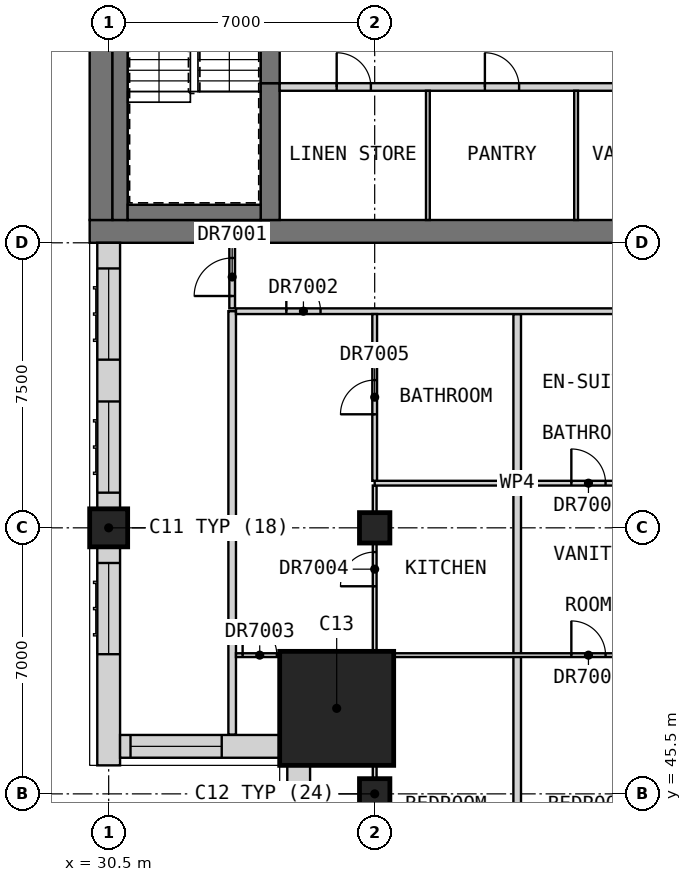
"""IFC4 building model, lengths in metres.
Left out: names, types, materials, properties, quantities, classifications, styles, units other than length and angle.
Written with IfcOpenShell. Run it as: python <this file> out.ifc"""

import sys

from ifc_helpers import new_model, si_unit, direction, frame, frame_2d, origin, origin_2d, place, context, subcontext, project, spatial, rectangle, extrude, element, fill, save


model = new_model("IFC4")
c1 = context("Model", 3, precision=1e-05, world=origin(), true_north=direction((0.0, 1.0)))
c2 = subcontext(c1, "Body", "Model", "MODEL_VIEW")
j1 = project(units=[si_unit("LENGTHUNIT", "METRE"), si_unit("PLANEANGLEUNIT", "RADIAN")], contexts=[c1])
p1 = place(None, origin())
s1 = spatial("IfcSite", under=j1, at=p1, CompositionType="ELEMENT")
p2 = place(p1, origin())
s2 = spatial("IfcBuilding", under=s1, at=p2, CompositionType="ELEMENT")
p3 = place(p2, frame((0.0, 0.0, 230.2)))
s3 = spatial("IfcBuildingStorey", under=s2, at=p3, CompositionType="ELEMENT", Elevation=230.2)
p4 = place(p3, frame((30.5, 52.5, 0.0), z_axis=(0.0, 0.0, 1.0), x_axis=(1.0, 0.0, 0.0)))
e1 = element("IfcColumn", 1, at=p4, inside=s3, PredefinedType="COLUMN", context=c2, shape_type="SweptSolid", body=[
    extrude(rectangle(XDim=1.0, YDim=1.0, at=origin_2d()), origin(), (0.0, 0.0, 1.0), 3.5),
])
for number, where, z_axis, x_axis in (
    (2, (37.5, 45.5, 0.0), (0.0, 0.0, 1.0), (1.0, 0.0, 0.0)),
    (3, (37.5, 52.5, 0.0), (0.0, 0.0, 1.0), (1.0, 0.0, 0.0)),
):
    element("IfcColumn", number, at=place(p3, frame(where, z_axis=z_axis, x_axis=x_axis)), inside=s3, PredefinedType="COLUMN", context=c2, shape_type="SweptSolid", body=[
        extrude(rectangle(XDim=0.8, YDim=0.8, at=origin_2d()), origin(), (0.0, 0.0, 1.0), 3.5),
    ])
p5 = place(p3, frame((36.5, 47.75, 0.0), z_axis=(0.0, 0.0, 1.0), x_axis=(1.0, 0.0, 0.0)))
e4 = element("IfcColumn", 4, at=p5, inside=s3, PredefinedType="COLUMN", context=c2, shape_type="SweptSolid", body=[
    extrude(rectangle(XDim=3.0, YDim=3.0, at=origin_2d()), origin(), (0.0, 0.0, 1.0), 3.5),
])
p6 = place(p3, frame((30.0, 60.3, 0.0), z_axis=(0.0, 0.0, 1.0), x_axis=(1.0, 0.0, 0.0)))
e5 = element("IfcWall", 5, at=p6, inside=s3, PredefinedType="SHEAR", context=c2, shape_type="SweptSolid", body=[
    extrude(rectangle(XDim=30.0, YDim=0.6, at=frame_2d((15.0, 0.0))), origin(), (0.0, 0.0, 1.0), 3.5),
])
p7 = place(p6, frame((21.9, 0.0, 0.0)))
e6 = element("IfcOpeningElement", 6, at=p7, cuts=e5, PredefinedType="OPENING", context=c2, shape_type="SweptSolid", body=[
    extrude(rectangle(XDim=1.8, YDim=2.1, at=frame_2d((0.9, 1.05))), frame((0.0, 0.31, 0.0), z_axis=(0.0, -1.0, 0.0), x_axis=(1.0, 0.0, 0.0)), (0.0, 0.0, 1.0), 0.62),
])
p8 = place(p6, frame((26.5, 0.0, 0.0)))
e7 = element("IfcOpeningElement", 7, at=p8, cuts=e5, PredefinedType="OPENING", context=c2, shape_type="SweptSolid", body=[
    extrude(rectangle(XDim=1.2, YDim=2.1, at=frame_2d((0.6, 1.05))), frame((0.0, 0.31, 0.0), z_axis=(0.0, -1.0, 0.0), x_axis=(1.0, 0.0, 0.0)), (0.0, 0.0, 1.0), 0.62),
])
p9 = place(p3, frame((30.3, 60.6, 0.0), z_axis=(0.0, 0.0, 1.0), x_axis=(0.0, 1.0, 0.0)))
e8 = element("IfcWall", 8, at=p9, inside=s3, PredefinedType="SHEAR", context=c2, shape_type="SweptSolid", body=[
    extrude(rectangle(XDim=21.3, YDim=0.6, at=frame_2d((10.65, 0.0))), origin(), (0.0, 0.0, 1.0), 3.5),
])
p10 = place(p3, frame((34.75, 60.6, 0.0), z_axis=(0.0, 0.0, 1.0), x_axis=(0.0, 1.0, 0.0)))
e9 = element("IfcWall", 9, at=p10, inside=s3, PredefinedType="SHEAR", context=c2, shape_type="SweptSolid", body=[
    extrude(rectangle(XDim=3.6, YDim=0.5, at=frame_2d((1.8, 0.0))), origin(), (0.0, 0.0, 1.0), 3.5),
])
p11 = place(p2, frame((0.0, 0.0, 34.0)))
s4 = spatial("IfcBuildingStorey", under=s2, at=p11, CompositionType="ELEMENT", Elevation=34.0)
p12 = place(p11, frame((29.7, 61.05, 0.0), z_axis=(0.0, 0.0, 1.0), x_axis=(0.0, 1.0, 0.0)))
e10 = element("IfcWall", 10, at=p12, inside=s4, PredefinedType="SOLIDWALL", context=c2, shape_type="SweptSolid", body=[
    extrude(rectangle(XDim=0.9, YDim=0.6, at=frame_2d((0.45, 0.0))), origin(), (0.0, 0.0, 1.0), 286.2),
])
p13 = place(p3, frame((30.5, 60.0, 0.0), z_axis=(0.0, 0.0, 1.0), x_axis=(0.0, -1.0, 0.0)))
e11 = element("IfcWall", 11, at=p13, inside=s3, PredefinedType="SOLIDWALL", context=c2, shape_type="SweptSolid", body=[
    extrude(rectangle(XDim=7.0, YDim=0.6, at=frame_2d((3.5, 0.0))), origin(), (0.0, 0.0, 1.0), 3.25),
])
p14 = place(p13, frame((4.175, 0.0, 0.8)))
e12 = element("IfcOpeningElement", 12, at=p14, cuts=e11, PredefinedType="OPENING", context=c2, shape_type="SweptSolid", body=[
    extrude(rectangle(XDim=2.4, YDim=1.8, at=frame_2d((1.2, 0.9))), frame((0.0, 0.31, 0.0), z_axis=(0.0, -1.0, 0.0), x_axis=(1.0, 0.0, 0.0)), (0.0, 0.0, 1.0), 0.62),
])
p15 = place(p13, frame((0.675, 0.0, 0.8)))
e13 = element("IfcOpeningElement", 13, at=p15, cuts=e11, PredefinedType="OPENING", context=c2, shape_type="SweptSolid", body=[
    extrude(rectangle(XDim=2.4, YDim=1.8, at=frame_2d((1.2, 0.9))), frame((0.0, 0.31, 0.0), z_axis=(0.0, -1.0, 0.0), x_axis=(1.0, 0.0, 0.0)), (0.0, 0.0, 1.0), 0.62),
])
p16 = place(p3, frame((30.5, 52.0, 0.0), z_axis=(0.0, 0.0, 1.0), x_axis=(0.0, -1.0, 0.0)))
e14 = element("IfcWall", 14, at=p16, inside=s3, PredefinedType="SOLIDWALL", context=c2, shape_type="SweptSolid", body=[
    extrude(rectangle(XDim=5.75, YDim=0.6, at=frame_2d((2.875, 0.0))), origin(), (0.0, 0.0, 1.0), 2.75),
])
p17 = place(p16, frame((0.425, 0.0, 0.8)))
e15 = element("IfcOpeningElement", 15, at=p17, cuts=e14, PredefinedType="OPENING", context=c2, shape_type="SweptSolid", body=[
    extrude(rectangle(XDim=2.4, YDim=1.8, at=frame_2d((1.2, 0.9))), frame((0.0, 0.31, 0.0), z_axis=(0.0, -1.0, 0.0), x_axis=(1.0, 0.0, 0.0)), (0.0, 0.0, 1.0), 0.62),
])
p18 = place(p3, frame((30.8, 46.75, 0.0), z_axis=(0.0, 0.0, 1.0), x_axis=(1.0, 0.0, 0.0)))
e16 = element("IfcWall", 16, at=p18, inside=s3, PredefinedType="SOLIDWALL", context=c2, shape_type="SweptSolid", body=[
    extrude(rectangle(XDim=4.2, YDim=0.6, at=frame_2d((2.1, 0.0))), origin(), (0.0, 0.0, 1.0), 3.25),
])
p19 = place(p18, frame((0.275, 0.0, 0.8)))
e17 = element("IfcOpeningElement", 17, at=p19, cuts=e16, PredefinedType="OPENING", context=c2, shape_type="SweptSolid", body=[
    extrude(rectangle(XDim=2.4, YDim=1.8, at=frame_2d((1.2, 0.9))), frame((0.0, 0.31, 0.0), z_axis=(0.0, -1.0, 0.0), x_axis=(1.0, 0.0, 0.0)), (0.0, 0.0, 1.0), 0.62),
])
p20 = place(p3, frame((35.5, 46.25, 0.0), z_axis=(0.0, 0.0, 1.0), x_axis=(0.0, -1.0, 0.0)))
e18 = element("IfcWall", 18, at=p20, inside=s3, PredefinedType="SOLIDWALL", context=c2, shape_type="SweptSolid", body=[
    extrude(rectangle(XDim=4.2, YDim=0.6, at=frame_2d((2.1, 0.0))), origin(), (0.0, 0.0, 1.0), 3.25),
])
p21 = place(p20, frame((1.525, 0.0, 0.8)))
e19 = element("IfcOpeningElement", 19, at=p21, cuts=e18, PredefinedType="OPENING", context=c2, shape_type="SweptSolid", body=[
    extrude(rectangle(XDim=2.4, YDim=1.8, at=frame_2d((1.2, 0.9))), frame((0.0, 0.31, 0.0), z_axis=(0.0, -1.0, 0.0), x_axis=(1.0, 0.0, 0.0)), (0.0, 0.0, 1.0), 0.62),
])
p22 = place(p3, frame((35.0, 64.1, 0.0), z_axis=(0.0, 0.0, 1.0), x_axis=(1.0, 0.0, 0.0)))
e20 = element("IfcWall", 20, at=p22, inside=s3, PredefinedType="PARTITIONING", context=c2, shape_type="SweptSolid", body=[
    extrude(rectangle(XDim=15.6, YDim=0.2, at=frame_2d((7.8, 0.0))), origin(), (0.0, 0.0, 1.0), 3.25),
])
p23 = place(p22, frame((1.5, 0.0, 0.0)))
e21 = element("IfcOpeningElement", 21, at=p23, cuts=e20, PredefinedType="OPENING", context=c2, shape_type="SweptSolid", body=[
    extrude(rectangle(XDim=0.9, YDim=2.1, at=frame_2d((0.45, 1.05))), frame((0.0, 0.11, 0.0), z_axis=(0.0, -1.0, 0.0), x_axis=(1.0, 0.0, 0.0)), (0.0, 0.0, 1.0), 0.22),
])
p24 = place(p22, frame((5.4, 0.0, 0.0)))
e22 = element("IfcOpeningElement", 22, at=p24, cuts=e20, PredefinedType="OPENING", context=c2, shape_type="SweptSolid", body=[
    extrude(rectangle(XDim=0.9, YDim=2.1, at=frame_2d((0.45, 1.05))), frame((0.0, 0.11, 0.0), z_axis=(0.0, -1.0, 0.0), x_axis=(1.0, 0.0, 0.0)), (0.0, 0.0, 1.0), 0.22),
])
p25 = place(p22, frame((9.3, 0.0, 0.0)))
e23 = element("IfcOpeningElement", 23, at=p25, cuts=e20, PredefinedType="OPENING", context=c2, shape_type="SweptSolid", body=[
    extrude(rectangle(XDim=0.9, YDim=2.1, at=frame_2d((0.45, 1.05))), frame((0.0, 0.11, 0.0), z_axis=(0.0, -1.0, 0.0), x_axis=(1.0, 0.0, 0.0)), (0.0, 0.0, 1.0), 0.22),
])
p26 = place(p22, frame((13.2, 0.0, 0.0)))
e24 = element("IfcOpeningElement", 24, at=p26, cuts=e20, PredefinedType="OPENING", context=c2, shape_type="SweptSolid", body=[
    extrude(rectangle(XDim=0.9, YDim=2.1, at=frame_2d((0.45, 1.05))), frame((0.0, 0.11, 0.0), z_axis=(0.0, -1.0, 0.0), x_axis=(1.0, 0.0, 0.0)), (0.0, 0.0, 1.0), 0.22),
])
for number, where, z_axis, x_axis in (
    (25, (38.9, 60.6, 0.0), (0.0, 0.0, 1.0), (0.0, 1.0, 0.0)),
    (26, (42.8, 60.6, 0.0), (0.0, 0.0, 1.0), (0.0, 1.0, 0.0)),
):
    element("IfcWall", number, at=place(p3, frame(where, z_axis=z_axis, x_axis=x_axis)), inside=s3, PredefinedType="PARTITIONING", context=c2, shape_type="SweptSolid", body=[
        extrude(rectangle(XDim=3.4, YDim=0.1, at=frame_2d((1.7, 0.0))), origin(), (0.0, 0.0, 1.0), 3.25),
    ])
p27 = place(p3, frame((34.75, 64.2, 0.0), z_axis=(0.0, 0.0, 1.0), x_axis=(0.0, 1.0, 0.0)))
e27 = element("IfcWall", 27, at=p27, inside=s3, PredefinedType="SOLIDWALL", context=c2, shape_type="SweptSolid", body=[
    extrude(rectangle(XDim=3.85, YDim=0.5, at=frame_2d((1.925, 0.0))), origin(), (0.0, 0.0, 1.0), 2.3),
])
p28 = place(p27, frame((2.3, 0.0, 0.0)))
e28 = element("IfcOpeningElement", 28, at=p28, cuts=e27, PredefinedType="OPENING", context=c2, shape_type="SweptSolid", body=[
    extrude(rectangle(XDim=1.2, YDim=2.1, at=frame_2d((0.6, 1.05))), frame((0.0, 0.26, 0.0), z_axis=(0.0, -1.0, 0.0), x_axis=(1.0, 0.0, 0.0)), (0.0, 0.0, 1.0), 0.52),
])
p29 = place(p3, frame((30.8, 60.6, 0.0), z_axis=(0.0, 0.0, 1.0), x_axis=(0.0, 1.0, 0.0)))
e29 = element("IfcWall", 29, at=p29, inside=s3, PredefinedType="SOLIDWALL", context=c2, shape_type="SweptSolid", body=[
    extrude(rectangle(XDim=21.3, YDim=0.4, at=frame_2d((10.65, 0.0))), origin(), (0.0, 0.0, 1.0), 3.25),
])
p30 = place(p3, frame((31.0, 60.8, 0.0), z_axis=(0.0, 0.0, 1.0), x_axis=(1.0, 0.0, 0.0)))
e30 = element("IfcWall", 30, at=p30, inside=s3, PredefinedType="SOLIDWALL", context=c2, shape_type="SweptSolid", body=[
    extrude(rectangle(XDim=3.5, YDim=0.4, at=frame_2d((1.75, 0.0))), origin(), (0.0, 0.0, 1.0), 3.25),
])
p31 = place(p3, frame((33.75, 47.06, 0.0), z_axis=(0.0, 0.0, 1.0), x_axis=(0.0, 1.0, 0.0)))
e31 = element("IfcWall", 31, at=p31, inside=s3, PredefinedType="PARTITIONING", context=c2, shape_type="SweptSolid", body=[
    extrude(rectangle(XDim=11.14, YDim=0.2, at=frame_2d((5.57, 0.0))), origin(), (0.0, 0.0, 1.0), 3.25),
])
p32 = place(p3, frame((41.25, 42.06, 0.0), z_axis=(0.0, 0.0, 1.0), x_axis=(0.0, 1.0, 0.0)))
e32 = element("IfcWall", 32, at=p32, inside=s3, PredefinedType="PARTITIONING", context=c2, shape_type="SweptSolid", body=[
    extrude(rectangle(XDim=16.065, YDim=0.2, at=frame_2d((8.032, 0.0))), origin(), (0.0, 0.0, 1.0), 3.25),
])
p33 = place(p3, frame((33.85, 58.2, 0.0), z_axis=(0.0, 0.0, 1.0), x_axis=(1.0, 0.0, 0.0)))
e33 = element("IfcWall", 33, at=p33, inside=s3, PredefinedType="PARTITIONING", context=c2, shape_type="SweptSolid", body=[
    extrude(rectangle(XDim=27.95, YDim=0.15, at=frame_2d((13.975, 0.0))), origin(), (0.0, 0.0, 1.0), 3.25),
])
p34 = place(p33, frame((1.325, 0.0, 0.0)))
e34 = element("IfcOpeningElement", 34, at=p34, cuts=e33, PredefinedType="OPENING", context=c2, shape_type="SweptSolid", body=[
    extrude(rectangle(XDim=0.9, YDim=2.1, at=frame_2d((0.45, 1.05))), frame((0.0, 0.085, 0.0), z_axis=(0.0, -1.0, 0.0), x_axis=(1.0, 0.0, 0.0)), (0.0, 0.0, 1.0), 0.17),
])
p35 = place(p33, frame((12.575, 0.0, 0.0)))
e35 = element("IfcOpeningElement", 35, at=p35, cuts=e33, PredefinedType="OPENING", context=c2, shape_type="SweptSolid", body=[
    extrude(rectangle(XDim=0.9, YDim=2.1, at=frame_2d((0.45, 1.05))), frame((0.0, 0.085, 0.0), z_axis=(0.0, -1.0, 0.0), x_axis=(1.0, 0.0, 0.0)), (0.0, 0.0, 1.0), 0.17),
])
p36 = place(p33, frame((20.075, 0.0, 0.0)))
e36 = element("IfcOpeningElement", 36, at=p36, cuts=e33, PredefinedType="OPENING", context=c2, shape_type="SweptSolid", body=[
    extrude(rectangle(XDim=0.9, YDim=2.1, at=frame_2d((0.45, 1.05))), frame((0.0, 0.085, 0.0), z_axis=(0.0, -1.0, 0.0), x_axis=(1.0, 0.0, 0.0)), (0.0, 0.0, 1.0), 0.17),
])
p37 = place(p33, frame((26.55, 0.0, 0.0)))
e37 = element("IfcOpeningElement", 37, at=p37, cuts=e33, PredefinedType="OPENING", context=c2, shape_type="SweptSolid", body=[
    extrude(rectangle(XDim=1.0, YDim=2.1, at=frame_2d((0.5, 1.05))), frame((0.0, 0.085, 0.0), z_axis=(0.0, -1.0, 0.0), x_axis=(1.0, 0.0, 0.0)), (0.0, 0.0, 1.0), 0.17),
])
p38 = place(p3, frame((33.75, 58.275, 0.0), z_axis=(0.0, 0.0, 1.0), x_axis=(0.0, 1.0, 0.0)))
e38 = element("IfcWall", 38, at=p38, inside=s3, PredefinedType="PARTITIONING", context=c2, shape_type="SweptSolid", body=[
    extrude(rectangle(XDim=1.725, YDim=0.15, at=frame_2d((0.863, 0.0))), origin(), (0.0, 0.0, 1.0), 3.25),
])
p39 = place(p38, frame((0.325, 0.0, 0.0)))
e39 = element("IfcOpeningElement", 39, at=p39, cuts=e38, PredefinedType="OPENING", context=c2, shape_type="SweptSolid", body=[
    extrude(rectangle(XDim=1.0, YDim=2.1, at=frame_2d((0.5, 1.05))), frame((0.0, 0.085, 0.0), z_axis=(0.0, -1.0, 0.0), x_axis=(1.0, 0.0, 0.0)), (0.0, 0.0, 1.0), 0.17),
])
p40 = place(p3, frame((33.85, 49.15, 0.0), z_axis=(0.0, 0.0, 1.0), x_axis=(1.0, 0.0, 0.0)))
e40 = element("IfcWall", 40, at=p40, inside=s3, PredefinedType="PARTITIONING", context=c2, shape_type="SweptSolid", body=[
    extrude(rectangle(XDim=26.05, YDim=0.1, at=frame_2d((13.025, 0.0))), origin(), (0.0, 0.0, 1.0), 3.25),
])
p41 = place(p40, frame((0.175, 0.0, 0.0)))
e41 = element("IfcOpeningElement", 41, at=p41, cuts=e40, PredefinedType="OPENING", context=c2, shape_type="SweptSolid", body=[
    extrude(rectangle(XDim=0.9, YDim=2.1, at=frame_2d((0.45, 1.05))), frame((0.0, 0.06, 0.0), z_axis=(0.0, -1.0, 0.0), x_axis=(1.0, 0.0, 0.0)), (0.0, 0.0, 1.0), 0.12),
])
p42 = place(p40, frame((8.825, 0.0, 0.0)))
e42 = element("IfcOpeningElement", 42, at=p42, cuts=e40, PredefinedType="OPENING", context=c2, shape_type="SweptSolid", body=[
    extrude(rectangle(XDim=0.9, YDim=2.1, at=frame_2d((0.45, 1.05))), frame((0.0, 0.06, 0.0), z_axis=(0.0, -1.0, 0.0), x_axis=(1.0, 0.0, 0.0)), (0.0, 0.0, 1.0), 0.12),
])
p43 = place(p40, frame((12.575, 0.0, 0.0)))
e43 = element("IfcOpeningElement", 43, at=p43, cuts=e40, PredefinedType="OPENING", context=c2, shape_type="SweptSolid", body=[
    extrude(rectangle(XDim=0.9, YDim=2.1, at=frame_2d((0.45, 1.05))), frame((0.0, 0.06, 0.0), z_axis=(0.0, -1.0, 0.0), x_axis=(1.0, 0.0, 0.0)), (0.0, 0.0, 1.0), 0.12),
])
p44 = place(p40, frame((20.075, 0.0, 0.0)))
e44 = element("IfcOpeningElement", 44, at=p44, cuts=e40, PredefinedType="OPENING", context=c2, shape_type="SweptSolid", body=[
    extrude(rectangle(XDim=0.9, YDim=2.1, at=frame_2d((0.45, 1.05))), frame((0.0, 0.06, 0.0), z_axis=(0.0, -1.0, 0.0), x_axis=(1.0, 0.0, 0.0)), (0.0, 0.0, 1.0), 0.12),
])
p45 = place(p3, frame((37.5, 41.25, 0.0), z_axis=(0.0, 0.0, 1.0), x_axis=(0.0, 1.0, 0.0)))
e45 = element("IfcWall", 45, at=p45, inside=s3, PredefinedType="PARTITIONING", context=c2, shape_type="SweptSolid", body=[
    extrude(rectangle(XDim=12.363, YDim=0.1, at=frame_2d((6.181, 0.0))), origin(), (0.0, 0.0, 1.0), 2.75),
])
p46 = place(p45, frame((9.712, 0.0, 0.0)))
e46 = element("IfcOpeningElement", 46, at=p46, cuts=e45, PredefinedType="OPENING", context=c2, shape_type="SweptSolid", body=[
    extrude(rectangle(XDim=0.9, YDim=2.1, at=frame_2d((0.45, 1.05))), frame((0.0, 0.06, 0.0), z_axis=(0.0, -1.0, 0.0), x_axis=(1.0, 0.0, 0.0)), (0.0, 0.0, 1.0), 0.12),
])
p47 = place(p45, frame((2.9, 0.0, 0.0)))
e47 = element("IfcOpeningElement", 47, at=p47, cuts=e45, PredefinedType="OPENING", context=c2, shape_type="SweptSolid", body=[
    extrude(rectangle(XDim=0.9, YDim=2.1, at=frame_2d((0.45, 1.05))), frame((0.0, 0.06, 0.0), z_axis=(0.0, -1.0, 0.0), x_axis=(1.0, 0.0, 0.0)), (0.0, 0.0, 1.0), 0.12),
])
p48 = place(p3, frame((37.5, 53.675, 0.0), z_axis=(0.0, 0.0, 1.0), x_axis=(1.0, 0.0, 0.0)))
e48 = element("IfcWall", 48, at=p48, inside=s3, PredefinedType="PARTITIONING", context=c2, shape_type="SweptSolid", body=[
    extrude(rectangle(XDim=7.5, YDim=0.125, at=frame_2d((3.75, 0.0))), origin(), (0.0, 0.0, 1.0), 3.25),
])
p49 = place(p48, frame((5.175, 0.0, 0.0)))
e49 = element("IfcOpeningElement", 49, at=p49, cuts=e48, PredefinedType="OPENING", context=c2, shape_type="SweptSolid", body=[
    extrude(rectangle(XDim=0.9, YDim=2.1, at=frame_2d((0.45, 1.05))), frame((0.0, 0.073, 0.0), z_axis=(0.0, -1.0, 0.0), x_axis=(1.0, 0.0, 0.0)), (0.0, 0.0, 1.0), 0.145),
])
p50 = place(p3, frame((37.5, 53.738, 0.0), z_axis=(0.0, 0.0, 1.0), x_axis=(0.0, 1.0, 0.0)))
e50 = element("IfcWall", 50, at=p50, inside=s3, PredefinedType="PARTITIONING", context=c2, shape_type="SweptSolid", body=[
    extrude(rectangle(XDim=4.387, YDim=0.125, at=frame_2d((2.194, 0.0))), origin(), (0.0, 0.0, 1.0), 3.25),
])
p51 = place(p50, frame((1.75, 0.0, 0.0)))
e51 = element("IfcOpeningElement", 51, at=p51, cuts=e50, PredefinedType="OPENING", context=c2, shape_type="SweptSolid", body=[
    extrude(rectangle(XDim=0.9, YDim=2.1, at=frame_2d((0.45, 1.05))), frame((0.0, 0.073, 0.0), z_axis=(0.0, -1.0, 0.0), x_axis=(1.0, 0.0, 0.0)), (0.0, 0.0, 1.0), 0.145),
])
p52 = place(p14, origin())
e52 = element("IfcWindow", 52, at=p52, inside=s3, PartitioningType="SINGLE_PANEL", PredefinedType="WINDOW", context=c2, shape_type="SweptSolid", body=[
    extrude(rectangle(XDim=2.4, YDim=1.8, at=frame_2d((1.2, 0.9))), frame((0.0, -0.07, 0.0), z_axis=(0.0, -1.0, 0.0), x_axis=(1.0, 0.0, 0.0)), (0.0, 0.0, 1.0), 0.06),
])
fill(e12, e52)
p53 = place(p15, origin())
e53 = element("IfcWindow", 53, at=p53, inside=s3, PartitioningType="SINGLE_PANEL", PredefinedType="WINDOW", context=c2, shape_type="SweptSolid", body=[
    extrude(rectangle(XDim=2.4, YDim=1.8, at=frame_2d((1.2, 0.9))), frame((0.0, -0.07, 0.0), z_axis=(0.0, -1.0, 0.0), x_axis=(1.0, 0.0, 0.0)), (0.0, 0.0, 1.0), 0.06),
])
fill(e13, e53)
p54 = place(p17, origin())
e54 = element("IfcWindow", 54, at=p54, inside=s3, PartitioningType="SINGLE_PANEL", PredefinedType="WINDOW", context=c2, shape_type="SweptSolid", body=[
    extrude(rectangle(XDim=2.4, YDim=1.8, at=frame_2d((1.2, 0.9))), frame((0.0, -0.07, 0.0), z_axis=(0.0, -1.0, 0.0), x_axis=(1.0, 0.0, 0.0)), (0.0, 0.0, 1.0), 0.06),
])
fill(e15, e54)
p55 = place(p19, origin())
e55 = element("IfcWindow", 55, at=p55, inside=s3, PartitioningType="SINGLE_PANEL", PredefinedType="WINDOW", context=c2, shape_type="SweptSolid", body=[
    extrude(rectangle(XDim=2.4, YDim=1.8, at=frame_2d((1.2, 0.9))), frame((0.0, -0.07, 0.0), z_axis=(0.0, -1.0, 0.0), x_axis=(1.0, 0.0, 0.0)), (0.0, 0.0, 1.0), 0.06),
])
fill(e17, e55)
p56 = place(p23, origin())
e56 = element("IfcDoor", 56, at=p56, inside=s3, OperationType="SINGLE_SWING_LEFT", PredefinedType="DOOR", context=c2, shape_type="SweptSolid", body=[
    extrude(rectangle(XDim=0.9, YDim=2.1, at=frame_2d((0.45, 1.05))), frame((0.0, 0.025, 0.0), z_axis=(0.0, -1.0, 0.0), x_axis=(1.0, 0.0, 0.0)), (0.0, 0.0, 1.0), 0.05),
])
fill(e21, e56)
p57 = place(p24, origin())
e57 = element("IfcDoor", 57, at=p57, inside=s3, OperationType="SINGLE_SWING_RIGHT", PredefinedType="DOOR", context=c2, shape_type="SweptSolid", body=[
    extrude(rectangle(XDim=0.9, YDim=2.1, at=frame_2d((0.45, 1.05))), frame((0.0, 0.025, 0.0), z_axis=(0.0, -1.0, 0.0), x_axis=(1.0, 0.0, 0.0)), (0.0, 0.0, 1.0), 0.05),
])
fill(e22, e57)
p58 = place(p39, origin())
e58 = element("IfcDoor", 58, at=p58, inside=s3, OperationType="SINGLE_SWING_RIGHT", PredefinedType="DOOR", context=c2, shape_type="SweptSolid", body=[
    extrude(rectangle(XDim=1.0, YDim=2.1, at=frame_2d((0.5, 1.05))), frame((0.0, 0.025, 0.0), z_axis=(0.0, -1.0, 0.0), x_axis=(1.0, 0.0, 0.0)), (0.0, 0.0, 1.0), 0.05),
])
fill(e39, e58)
p59 = place(p34, origin())
e59 = element("IfcDoor", 59, at=p59, inside=s3, OperationType="SINGLE_SWING_RIGHT", PredefinedType="DOOR", context=c2, shape_type="SweptSolid", body=[
    extrude(rectangle(XDim=0.9, YDim=2.1, at=frame_2d((0.45, 1.05))), frame((0.0, 0.025, 0.0), z_axis=(0.0, -1.0, 0.0), x_axis=(1.0, 0.0, 0.0)), (0.0, 0.0, 1.0), 0.05),
])
fill(e34, e59)
p60 = place(p41, origin())
e60 = element("IfcDoor", 60, at=p60, inside=s3, OperationType="SINGLE_SWING_LEFT", PredefinedType="DOOR", context=c2, shape_type="SweptSolid", body=[
    extrude(rectangle(XDim=0.9, YDim=2.1, at=frame_2d((0.45, 1.05))), frame((0.0, 0.025, 0.0), z_axis=(0.0, -1.0, 0.0), x_axis=(1.0, 0.0, 0.0)), (0.0, 0.0, 1.0), 0.05),
])
fill(e41, e60)
p61 = place(p46, origin())
e61 = element("IfcDoor", 61, at=p61, inside=s3, OperationType="SINGLE_SWING_LEFT", PredefinedType="DOOR", context=c2, shape_type="SweptSolid", body=[
    extrude(rectangle(XDim=0.9, YDim=2.1, at=frame_2d((0.45, 1.05))), frame((0.0, 0.025, 0.0), z_axis=(0.0, -1.0, 0.0), x_axis=(1.0, 0.0, 0.0)), (0.0, 0.0, 1.0), 0.05),
])
fill(e46, e61)
p62 = place(p51, origin())
e62 = element("IfcDoor", 62, at=p62, inside=s3, OperationType="SINGLE_SWING_RIGHT", PredefinedType="DOOR", context=c2, shape_type="SweptSolid", body=[
    extrude(rectangle(XDim=0.9, YDim=2.1, at=frame_2d((0.45, 1.05))), frame((0.0, 0.025, 0.0), z_axis=(0.0, -1.0, 0.0), x_axis=(1.0, 0.0, 0.0)), (0.0, 0.0, 1.0), 0.05),
])
fill(e51, e62)
p63 = place(p42, origin())
e63 = element("IfcDoor", 63, at=p63, inside=s3, OperationType="SINGLE_SWING_LEFT", PredefinedType="DOOR", context=c2, shape_type="SweptSolid", body=[
    extrude(rectangle(XDim=0.9, YDim=2.1, at=frame_2d((0.45, 1.05))), frame((0.0, 0.025, 0.0), z_axis=(0.0, -1.0, 0.0), x_axis=(1.0, 0.0, 0.0)), (0.0, 0.0, 1.0), 0.05),
])
fill(e42, e63)
p64 = place(p49, origin())
e64 = element("IfcDoor", 64, at=p64, inside=s3, OperationType="SINGLE_SWING_LEFT", PredefinedType="DOOR", context=c2, shape_type="SweptSolid", body=[
    extrude(rectangle(XDim=0.9, YDim=2.1, at=frame_2d((0.45, 1.05))), frame((0.0, 0.025, 0.0), z_axis=(0.0, -1.0, 0.0), x_axis=(1.0, 0.0, 0.0)), (0.0, 0.0, 1.0), 0.05),
])
fill(e49, e64)
save(model, sys.argv[1])
